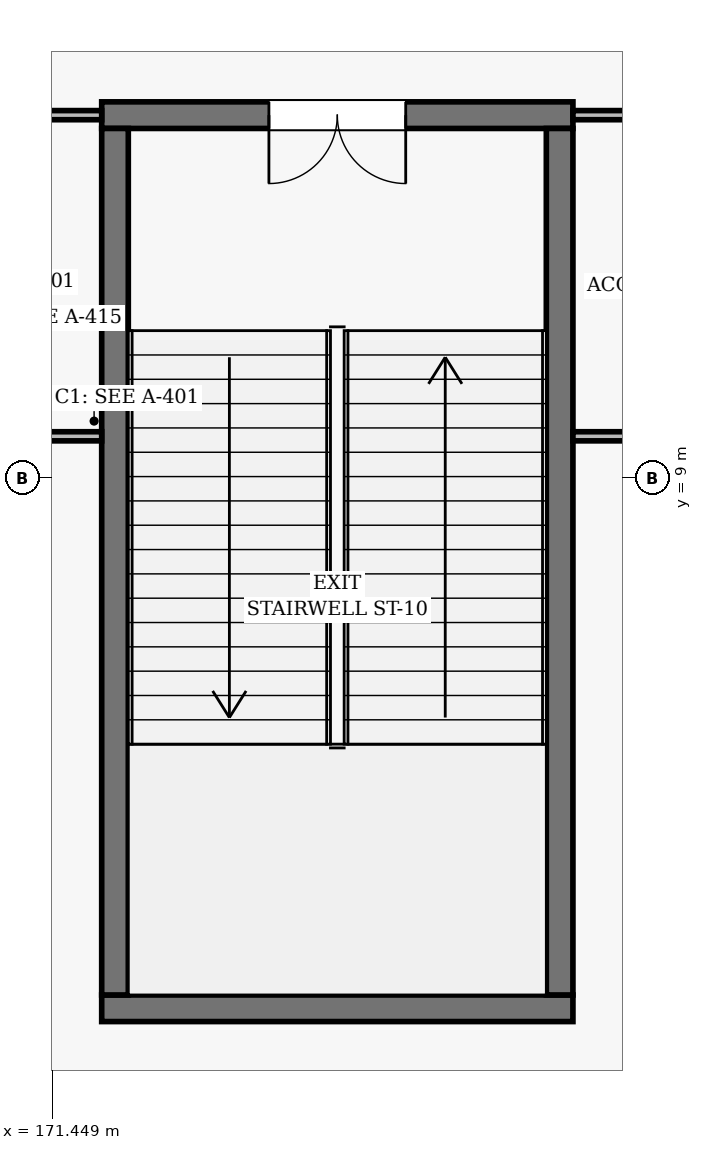
"""IFC4 building model, lengths in metres.
Left out: names, types, materials, properties, quantities, classifications, styles, units other than length and angle.
Written with IfcOpenShell. Run it as: python <this file> out.ifc"""

import sys

from ifc_helpers import new_model, si_unit, direction, frame, frame_2d, origin, place, context, subcontext, project, spatial, rectangle, extrude, element, fill, save


model = new_model("IFC4")
c1 = context("Model", 3, precision=1e-05, world=origin(), true_north=direction((0.0, 1.0)))
c2 = subcontext(c1, "Body", "Model", "MODEL_VIEW")
j1 = project(units=[si_unit("LENGTHUNIT", "METRE"), si_unit("PLANEANGLEUNIT", "RADIAN")], contexts=[c1])
p1 = place(None, origin())
s1 = spatial("IfcSite", under=j1, at=p1, CompositionType="ELEMENT")
p2 = place(p1, origin())
s2 = spatial("IfcBuilding", under=s1, at=p2, CompositionType="ELEMENT")
p3 = place(p2, frame((0.0, 0.0, -5.4)))
s3 = spatial("IfcBuildingStorey", under=s2, at=p3, CompositionType="ELEMENT", Elevation=-5.4)
p4 = place(p3, frame((172.1, 2.025, 0.0), z_axis=(0.0, 0.0, 1.0), x_axis=(1.0, 0.0, 0.0)))
e1 = element("IfcWall", 1, at=p4, inside=s3, PredefinedType="SHEAR", context=c2, shape_type="SweptSolid", body=[
    extrude(rectangle(XDim=6.2, YDim=0.35, at=frame_2d((3.1, 0.0))), origin(), (0.0, 0.0, 1.0), 5.12),
])
p5 = place(p3, frame((178.3, 13.775, 0.0), z_axis=(0.0, 0.0, 1.0), x_axis=(-1.0, 0.0, 0.0)))
e2 = element("IfcWall", 2, at=p5, inside=s3, PredefinedType="SHEAR", context=c2, shape_type="SweptSolid", body=[
    extrude(rectangle(XDim=6.2, YDim=0.35, at=frame_2d((3.1, 0.0))), origin(), (0.0, 0.0, 1.0), 5.12),
])
p6 = place(p5, frame((2.2, 0.0, 0.0)))
e3 = element("IfcOpeningElement", 3, at=p6, cuts=e2, PredefinedType="OPENING", context=c2, shape_type="SweptSolid", body=[
    extrude(rectangle(XDim=1.8, YDim=2.2, at=frame_2d((0.9, 1.1))), frame((0.0, 0.185, 0.0), z_axis=(0.0, -1.0, 0.0), x_axis=(1.0, 0.0, 0.0)), (0.0, 0.0, 1.0), 0.37),
])
for number, where, z_axis, x_axis in (
    (4, (172.275, 13.6, 0.0), (0.0, 0.0, 1.0), (0.0, -1.0, 0.0)),
    (5, (178.125, 2.2, 0.0), (0.0, 0.0, 1.0), (0.0, 1.0, 0.0)),
):
    element("IfcWall", number, at=place(p3, frame(where, z_axis=z_axis, x_axis=x_axis)), inside=s3, PredefinedType="SHEAR", context=c2, shape_type="SweptSolid", body=[
        extrude(rectangle(XDim=11.4, YDim=0.35, at=frame_2d((5.7, 0.0))), origin(), (0.0, 0.0, 1.0), 5.12),
    ])
p7 = place(p3, frame((169.1, 13.775, 0.0), z_axis=(0.0, 0.0, 1.0), x_axis=(1.0, 0.0, 0.0)))
e6 = element("IfcWall", 6, at=p7, inside=s3, PredefinedType="PARTITIONING", context=c2, shape_type="SweptSolid", body=[
    extrude(rectangle(XDim=3.0, YDim=0.12, at=frame_2d((1.5, 0.0))), origin(), (0.0, 0.0, 1.0), 4.332),
])
p8 = place(p7, frame((1.04, 0.0, 0.0)))
e7 = element("IfcOpeningElement", 7, at=p8, cuts=e6, PredefinedType="OPENING", context=c2, shape_type="SweptSolid", body=[
    extrude(rectangle(XDim=0.92, YDim=2.12, at=frame_2d((0.46, 1.06))), frame((0.0, 0.07, 0.0), z_axis=(0.0, -1.0, 0.0), x_axis=(1.0, 0.0, 0.0)), (0.0, 0.0, 1.0), 0.14),
])
p9 = place(p3, frame((172.1, 9.55, 0.0), z_axis=(0.0, 0.0, 1.0), x_axis=(-1.0, 0.0, 0.0)))
e8 = element("IfcWall", 8, at=p9, inside=s3, PredefinedType="PARTITIONING", context=c2, shape_type="SweptSolid", body=[
    extrude(rectangle(XDim=3.0, YDim=0.12, at=frame_2d((1.5, 0.0))), origin(), (0.0, 0.0, 1.0), 4.332),
])
p10 = place(p3, frame((178.3, 13.775, 0.0), z_axis=(0.0, 0.0, 1.0), x_axis=(1.0, 0.0, 0.0)))
e9 = element("IfcWall", 9, at=p10, inside=s3, PredefinedType="PARTITIONING", context=c2, shape_type="SweptSolid", body=[
    extrude(rectangle(XDim=3.39, YDim=0.12, at=frame_2d((1.695, 0.0))), origin(), (0.0, 0.0, 1.0), 4.332),
])
p11 = place(p10, frame((1.185, 0.0, 0.0)))
e10 = element("IfcOpeningElement", 10, at=p11, cuts=e9, PredefinedType="OPENING", context=c2, shape_type="SweptSolid", body=[
    extrude(rectangle(XDim=1.02, YDim=2.16, at=frame_2d((0.51, 1.08))), frame((0.0, 0.07, 0.0), z_axis=(0.0, -1.0, 0.0), x_axis=(1.0, 0.0, 0.0)), (0.0, 0.0, 1.0), 0.14),
])
p12 = place(p3, frame((182.85, 9.55, 0.0), z_axis=(0.0, 0.0, 1.0), x_axis=(-1.0, 0.0, 0.0)))
e11 = element("IfcWall", 11, at=p12, inside=s3, PredefinedType="PARTITIONING", context=c2, shape_type="SweptSolid", body=[
    extrude(rectangle(XDim=4.55, YDim=0.12, at=frame_2d((2.275, 0.0))), origin(), (0.0, 0.0, 1.0), 4.332),
])
p13 = place(p6, origin())
e12 = element("IfcDoor", 12, at=p13, inside=s3, OperationType="DOUBLE_DOOR_SINGLE_SWING", PredefinedType="DOOR", context=c2, shape_type="SweptSolid", body=[
    extrude(rectangle(XDim=1.8, YDim=2.2, at=frame_2d((0.9, 1.1))), frame((0.0, 0.025, 0.0), z_axis=(0.0, -1.0, 0.0), x_axis=(1.0, 0.0, 0.0)), (0.0, 0.0, 1.0), 0.05),
])
fill(e3, e12)
save(model, sys.argv[1])
